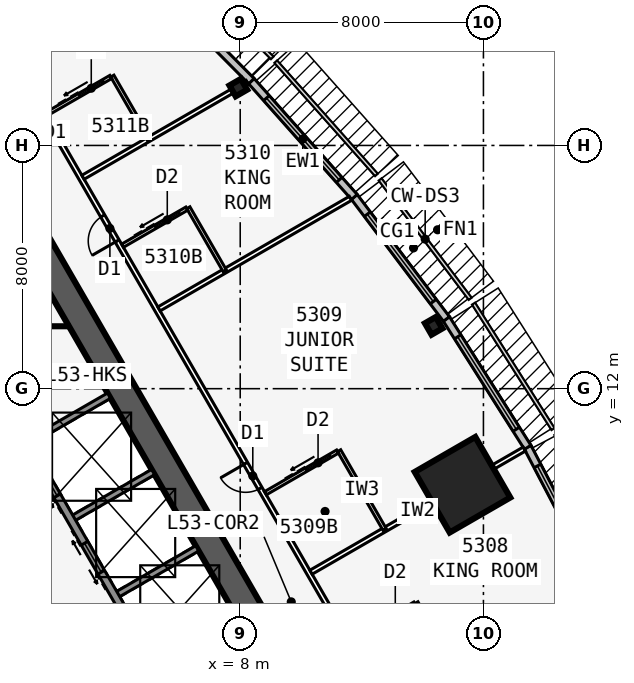
"""IFC4 building model, lengths in metres.
Left out: names, types, materials, properties, quantities, classifications, styles, units other than length and angle.
Written with IfcOpenShell. Run it as: python <this file> out.ifc"""

import sys

from ifc_helpers import new_model, si_unit, direction, frame, frame_2d, origin, origin_2d, place, context, subcontext, project, spatial, rectangle, i_section, extrude, element, fill, save


model = new_model("IFC4")
c1 = context("Model", 3, precision=1e-05, world=origin(), true_north=direction((0.0, 1.0)))
c2 = subcontext(c1, "Body", "Model", "MODEL_VIEW")
j1 = project(units=[si_unit("LENGTHUNIT", "METRE"), si_unit("PLANEANGLEUNIT", "RADIAN")], contexts=[c1])
p1 = place(None, origin())
s1 = spatial("IfcSite", under=j1, at=p1, CompositionType="ELEMENT")
p2 = place(p1, origin())
s2 = spatial("IfcBuilding", under=s1, at=p2, CompositionType="ELEMENT")
p3 = place(p2, frame((0.0, 0.0, 200.9)))
s3 = spatial("IfcBuildingStorey", under=s2, at=p3, CompositionType="ELEMENT", Elevation=200.9)
p4 = place(p3, frame((16.5, -9.526, 0.0), z_axis=(0.0, 0.0, 1.0), x_axis=(-0.499999749417, 0.866025548458, 0.0)))
e1 = element("IfcWall", 1, at=p4, inside=s3, PredefinedType="SHEAR", context=c2, shape_type="SweptSolid", body=[
    extrude(rectangle(XDim=33.0, YDim=0.9, at=frame_2d((16.5, 0.0))), origin(), (0.0, 0.0, 1.0), 3.6),
])
p5 = place(p4, frame((14.15, 0.0, 0.0)))
e2 = element("IfcOpeningElement", 2, at=p5, cuts=e1, PredefinedType="OPENING", context=c2, shape_type="SweptSolid", body=[
    extrude(rectangle(XDim=1.8, YDim=2.13, at=frame_2d((0.9, 1.065))), frame((0.0, 0.46, 0.0), z_axis=(0.0, -1.0, 0.0), x_axis=(1.0, 0.0, 0.0)), (0.0, 0.0, 1.0), 0.92),
])
p6 = place(p4, frame((12.6, 0.0, 0.0)))
e3 = element("IfcOpeningElement", 3, at=p6, cuts=e1, PredefinedType="OPENING", context=c2, shape_type="SweptSolid", body=[
    extrude(rectangle(XDim=1.0, YDim=2.13, at=frame_2d((0.5, 1.065))), frame((0.0, 0.46, 0.0), z_axis=(0.0, -1.0, 0.0), x_axis=(1.0, 0.0, 0.0)), (0.0, 0.0, 1.0), 0.92),
])
p7 = place(p3, frame((5.379, 2.586, 0.0), z_axis=(0.0, 0.0, 1.0), x_axis=(-0.500001375892, 0.866024609411, 0.0)))
e4 = element("IfcWall", 4, at=p7, inside=s3, PredefinedType="SOLIDWALL", context=c2, shape_type="SweptSolid", body=[
    extrude(rectangle(XDim=10.633, YDim=0.25, at=frame_2d((5.316, 0.0))), origin(), (0.0, 0.0, 1.0), 3.435),
])
p8 = place(p7, frame((9.164, 0.0, 0.0)))
e5 = element("IfcOpeningElement", 5, at=p8, cuts=e4, PredefinedType="OPENING", context=c2, shape_type="SweptSolid", body=[
    extrude(rectangle(XDim=0.9, YDim=2.13, at=frame_2d((0.45, 1.065))), frame((0.0, 0.135, 0.0), z_axis=(0.0, -1.0, 0.0), x_axis=(1.0, 0.0, 0.0)), (0.0, 0.0, 1.0), 0.27),
])
p9 = place(p7, frame((1.0, 0.0, 0.0)))
e6 = element("IfcOpeningElement", 6, at=p9, cuts=e4, PredefinedType="OPENING", context=c2, shape_type="SweptSolid", body=[
    extrude(rectangle(XDim=1.1, YDim=2.13, at=frame_2d((0.55, 1.065))), frame((0.0, 0.135, 0.0), z_axis=(0.0, -1.0, 0.0), x_axis=(1.0, 0.0, 0.0)), (0.0, 0.0, 1.0), 0.27),
])
p10 = place(p7, frame((3.9, 0.0, 0.0)))
e7 = element("IfcOpeningElement", 7, at=p10, cuts=e4, PredefinedType="OPENING", context=c2, shape_type="SweptSolid", body=[
    extrude(rectangle(XDim=1.1, YDim=2.13, at=frame_2d((0.55, 1.065))), frame((0.0, 0.135, 0.0), z_axis=(0.0, -1.0, 0.0), x_axis=(1.0, 0.0, 0.0)), (0.0, 0.0, 1.0), 0.27),
])
p11 = place(p7, frame((6.8, 0.0, 0.0)))
e8 = element("IfcOpeningElement", 8, at=p11, cuts=e4, PredefinedType="OPENING", context=c2, shape_type="SweptSolid", body=[
    extrude(rectangle(XDim=1.1, YDim=2.13, at=frame_2d((0.55, 1.065))), frame((0.0, 0.135, 0.0), z_axis=(0.0, -1.0, 0.0), x_axis=(1.0, 0.0, 0.0)), (0.0, 0.0, 1.0), 0.27),
])
for number, where, z_axis, x_axis in (
    (9, (3.879, 5.184, 0.0), (0.0, 0.0, 1.0), (0.866, 0.5, 0.0)),
    (10, (2.429, 7.696, 0.0), (0.0, 0.0, 1.0), (0.866, 0.5, 0.0)),
    (11, (0.979, 10.207, 0.0), (0.0, 0.0, 1.0), (0.866, 0.5, 0.0)),
):
    element("IfcWall", number, at=place(p3, frame(where, z_axis=z_axis, x_axis=x_axis)), inside=s3, PredefinedType="SOLIDWALL", context=c2, shape_type="SweptSolid", body=[
        extrude(rectangle(XDim=3.125, YDim=0.2, at=frame_2d((1.562, 0.0))), origin(), (0.0, 0.0, 1.0), 3.435),
    ])
for number, where, z_axis, x_axis in (
    (12, (14.363, 14.066, 0.0), (0.0, 0.0, 1.0), (0.866, 0.5, 0.0)),
    (13, (7.937, 21.903, 0.0), (0.0, 0.0, 1.0), (-0.5, 0.866, 0.0)),
):
    element("IfcColumn", number, at=place(p3, frame(where, z_axis=z_axis, x_axis=x_axis)), inside=s3, PredefinedType="COLUMN", context=c2, shape_type="SweptSolid", body=[
        extrude(i_section(OverallWidth=0.411, OverallDepth=0.434, WebThickness=0.036, FlangeThickness=0.057, at=origin_2d()), origin(), (0.0, 0.0, 1.0), 3.6),
    ])
p12 = place(p3, frame((15.312, 8.84, 0.0), z_axis=(0.0, 0.0, 1.0), x_axis=(0.866025403784, 0.5, 0.0)))
e14 = element("IfcColumn", 14, at=p12, inside=s3, PredefinedType="COLUMN", context=c2, shape_type="SweptSolid", body=[
    extrude(rectangle(XDim=2.3, YDim=2.3, at=origin_2d()), origin(), (0.0, 0.0, 1.0), 3.6),
])
p13 = place(p3, frame((19.772, 5.648, 0.0), z_axis=(0.0, 0.0, 1.0), x_axis=(-0.463976002579, 0.885847768542, 0.0)))
e15 = element("IfcWall", 15, at=p13, inside=s3, PredefinedType="STANDARD", context=c2, shape_type="SweptSolid", body=[
    extrude(rectangle(XDim=5.004, YDim=0.25, at=frame_2d((2.502, 0.0))), origin(), (0.0, 0.0, 1.0), 3.435),
])
p14 = place(p13, frame((0.702, 0.0, 0.45)))
e16 = element("IfcOpeningElement", 16, at=p14, cuts=e15, PredefinedType="OPENING", context=c2, shape_type="SweptSolid", body=[
    extrude(rectangle(XDim=3.6, YDim=2.6, at=frame_2d((1.8, 1.3))), frame((0.0, 0.135, 0.0), z_axis=(0.0, -1.0, 0.0), x_axis=(1.0, 0.0, 0.0)), (0.0, 0.0, 1.0), 0.27),
])
p15 = place(p3, frame((17.456, 10.072, 0.0), z_axis=(0.0, 0.0, 1.0), x_axis=(-0.535220361449, 0.844712474568, 0.0)))
e17 = element("IfcWall", 17, at=p15, inside=s3, PredefinedType="STANDARD", context=c2, shape_type="SweptSolid", body=[
    extrude(rectangle(XDim=5.004, YDim=0.25, at=frame_2d((2.502, 0.0))), origin(), (0.0, 0.0, 1.0), 3.435),
])
p16 = place(p15, frame((0.702, 0.0, 0.45)))
e18 = element("IfcOpeningElement", 18, at=p16, cuts=e17, PredefinedType="OPENING", context=c2, shape_type="SweptSolid", body=[
    extrude(rectangle(XDim=3.6, YDim=2.6, at=frame_2d((1.8, 1.3))), frame((0.0, 0.135, 0.0), z_axis=(0.0, -1.0, 0.0), x_axis=(1.0, 0.0, 0.0)), (0.0, 0.0, 1.0), 0.27),
])
p17 = place(p3, frame((14.783, 14.291, 0.0), z_axis=(0.0, 0.0, 1.0), x_axis=(-0.602408653511, 0.798187831388, 0.0)))
e19 = element("IfcWall", 19, at=p17, inside=s3, PredefinedType="STANDARD", context=c2, shape_type="SweptSolid", body=[
    extrude(rectangle(XDim=5.038, YDim=0.25, at=frame_2d((2.519, 0.0))), origin(), (0.0, 0.0, 1.0), 3.435),
])
p18 = place(p17, frame((0.719, 0.0, 0.45)))
e20 = element("IfcOpeningElement", 20, at=p18, cuts=e19, PredefinedType="OPENING", context=c2, shape_type="SweptSolid", body=[
    extrude(rectangle(XDim=3.6, YDim=2.6, at=frame_2d((1.8, 1.3))), frame((0.0, 0.135, 0.0), z_axis=(0.0, -1.0, 0.0), x_axis=(1.0, 0.0, 0.0)), (0.0, 0.0, 1.0), 0.27),
])
p19 = place(p3, frame((11.754, 18.304, 0.0), z_axis=(0.0, 0.0, 1.0), x_axis=(-0.664348996191, 0.747422511876, 0.0)))
e21 = element("IfcWall", 21, at=p19, inside=s3, PredefinedType="STANDARD", context=c2, shape_type="SweptSolid", body=[
    extrude(rectangle(XDim=5.105, YDim=0.25, at=frame_2d((2.552, 0.0))), origin(), (0.0, 0.0, 1.0), 3.435),
])
p20 = place(p19, frame((0.752, 0.0, 0.45)))
e22 = element("IfcOpeningElement", 22, at=p20, cuts=e21, PredefinedType="OPENING", context=c2, shape_type="SweptSolid", body=[
    extrude(rectangle(XDim=3.6, YDim=2.6, at=frame_2d((1.8, 1.3))), frame((0.0, 0.135, 0.0), z_axis=(0.0, -1.0, 0.0), x_axis=(1.0, 0.0, 0.0)), (0.0, 0.0, 1.0), 0.27),
])
p21 = place(p3, frame((8.368, 22.115, 0.0), z_axis=(0.0, 0.0, 1.0), x_axis=(-0.704149946111, 0.710051303352, 0.0)))
e23 = element("IfcWall", 23, at=p21, inside=s3, PredefinedType="STANDARD", context=c2, shape_type="SweptSolid", body=[
    extrude(rectangle(XDim=2.069, YDim=0.25, at=frame_2d((1.034, 0.0))), origin(), (0.0, 0.0, 1.0), 3.435),
])
p22 = place(p3, frame((20.027, -10.985, 0.0), z_axis=(0.0, 0.0, 1.0), x_axis=(-0.500001677587, 0.866024435227, 0.0)))
e24 = element("IfcWall", 24, at=p22, inside=s3, PredefinedType="PARTITIONING", context=c2, shape_type="SweptSolid", body=[
    extrude(rectangle(XDim=39.054, YDim=0.15, at=frame_2d((19.527, 0.0))), origin(), (0.0, 0.0, 1.0), 3.435),
])
p23 = place(p22, frame((1.558, 0.0, 0.0)))
e25 = element("IfcOpeningElement", 25, at=p23, cuts=e24, PredefinedType="OPENING", context=c2, shape_type="SweptSolid", body=[
    extrude(rectangle(XDim=0.95, YDim=2.13, at=frame_2d((0.475, 1.065))), frame((0.0, 0.085, 0.0), z_axis=(0.0, -1.0, 0.0), x_axis=(1.0, 0.0, 0.0)), (0.0, 0.0, 1.0), 0.17),
])
p24 = place(p22, frame((12.752, 0.0, 0.0)))
e26 = element("IfcOpeningElement", 26, at=p24, cuts=e24, PredefinedType="OPENING", context=c2, shape_type="SweptSolid", body=[
    extrude(rectangle(XDim=0.95, YDim=2.13, at=frame_2d((0.475, 1.065))), frame((0.0, 0.085, 0.0), z_axis=(0.0, -1.0, 0.0), x_axis=(1.0, 0.0, 0.0)), (0.0, 0.0, 1.0), 0.17),
])
p25 = place(p22, frame((17.152, 0.0, 0.0)))
e27 = element("IfcOpeningElement", 27, at=p25, cuts=e24, PredefinedType="OPENING", context=c2, shape_type="SweptSolid", body=[
    extrude(rectangle(XDim=0.95, YDim=2.13, at=frame_2d((0.475, 1.065))), frame((0.0, 0.085, 0.0), z_axis=(0.0, -1.0, 0.0), x_axis=(1.0, 0.0, 0.0)), (0.0, 0.0, 1.0), 0.17),
])
p26 = place(p22, frame((22.752, 0.0, 0.0)))
e28 = element("IfcOpeningElement", 28, at=p26, cuts=e24, PredefinedType="OPENING", context=c2, shape_type="SweptSolid", body=[
    extrude(rectangle(XDim=0.95, YDim=2.13, at=frame_2d((0.475, 1.065))), frame((0.0, 0.085, 0.0), z_axis=(0.0, -1.0, 0.0), x_axis=(1.0, 0.0, 0.0)), (0.0, 0.0, 1.0), 0.17),
])
p27 = place(p22, frame((32.152, 0.0, 0.0)))
e29 = element("IfcOpeningElement", 29, at=p27, cuts=e24, PredefinedType="OPENING", context=c2, shape_type="SweptSolid", body=[
    extrude(rectangle(XDim=0.95, YDim=2.13, at=frame_2d((0.475, 1.065))), frame((0.0, 0.085, 0.0), z_axis=(0.0, -1.0, 0.0), x_axis=(1.0, 0.0, 0.0)), (0.0, 0.0, 1.0), 0.17),
])
p28 = place(p22, frame((37.152, 0.0, 0.0)))
e30 = element("IfcOpeningElement", 30, at=p28, cuts=e24, PredefinedType="OPENING", context=c2, shape_type="SweptSolid", body=[
    extrude(rectangle(XDim=0.95, YDim=2.13, at=frame_2d((0.475, 1.065))), frame((0.0, 0.085, 0.0), z_axis=(0.0, -1.0, 0.0), x_axis=(1.0, 0.0, 0.0)), (0.0, 0.0, 1.0), 0.17),
])
p29 = place(p3, frame((12.829, 1.633, 0.0), z_axis=(0.0, 0.0, 1.0), x_axis=(0.866030558329, 0.49999107196, 0.0)))
e31 = element("IfcWall", 31, at=p29, inside=s3, PredefinedType="PARTITIONING", context=c2, shape_type="SweptSolid", body=[
    extrude(rectangle(XDim=7.894, YDim=0.15, at=frame_2d((3.947, 0.0))), origin(), (0.0, 0.0, 1.0), 2.589),
])
p30 = place(p3, frame((10.329, 5.963, 0.0), z_axis=(0.0, 0.0, 1.0), x_axis=(0.866016460812, 0.500015489362, 0.0)))
e32 = element("IfcWall", 32, at=p30, inside=s3, PredefinedType="PARTITIONING", context=c2, shape_type="SweptSolid", body=[
    extrude(rectangle(XDim=8.101, YDim=0.15, at=frame_2d((4.051, 0.0))), origin(), (0.0, 0.0, 1.0), 2.589),
])
p31 = place(p3, frame((5.329, 14.623, 0.0), z_axis=(0.0, 0.0, 1.0), x_axis=(0.866017877653, 0.500013035415, 0.0)))
e33 = element("IfcWall", 33, at=p31, inside=s3, PredefinedType="PARTITIONING", context=c2, shape_type="SweptSolid", body=[
    extrude(rectangle(XDim=7.273, YDim=0.15, at=frame_2d((3.636, 0.0))), origin(), (0.0, 0.0, 1.0), 2.589),
])
p32 = place(p3, frame((2.829, 18.954, 0.0), z_axis=(0.0, 0.0, 1.0), x_axis=(0.866026604282, 0.499997920671, 0.0)))
e34 = element("IfcWall", 34, at=p32, inside=s3, PredefinedType="PARTITIONING", context=c2, shape_type="SweptSolid", body=[
    extrude(rectangle(XDim=6.24, YDim=0.15, at=frame_2d((3.12, 0.0))), origin(), (0.0, 0.0, 1.0), 2.589),
])
p33 = place(p3, frame((14.993, 2.883, 0.0), z_axis=(0.0, 0.0, 1.0), x_axis=(-0.500001309137, 0.866024647952, 0.0)))
e35 = element("IfcWall", 35, at=p33, inside=s3, PredefinedType="PLUMBINGWALL", context=c2, shape_type="SweptSolid", body=[
    extrude(rectangle(XDim=2.4, YDim=0.12, at=frame_2d((1.2, 0.0))), origin(), (0.0, 0.0, 1.0), 3.435),
])
p34 = place(p3, frame((11.628, 3.711, 0.0), z_axis=(0.0, 0.0, 1.0), x_axis=(0.866048967903, 0.499959183527, 0.0)))
e36 = element("IfcWall", 36, at=p34, inside=s3, PredefinedType="PLUMBINGWALL", context=c2, shape_type="SweptSolid", body=[
    extrude(rectangle(XDim=2.44, YDim=0.12, at=frame_2d((1.22, 0.0))), origin(), (0.0, 0.0, 1.0), 3.435),
])
p35 = place(p34, frame((1.25, 0.0, 0.0)))
e37 = element("IfcOpeningElement", 37, at=p35, cuts=e36, PredefinedType="OPENING", context=c2, shape_type="SweptSolid", body=[
    extrude(rectangle(XDim=0.9, YDim=2.13, at=frame_2d((0.45, 1.065))), frame((0.0, 0.07, 0.0), z_axis=(0.0, -1.0, 0.0), x_axis=(1.0, 0.0, 0.0)), (0.0, 0.0, 1.0), 0.14),
])
p36 = place(p3, frame((12.753, 7.363, 0.0), z_axis=(0.0, 0.0, 1.0), x_axis=(-0.499990139034, 0.866031096941, 0.0)))
e38 = element("IfcWall", 38, at=p36, inside=s3, PredefinedType="PLUMBINGWALL", context=c2, shape_type="SweptSolid", body=[
    extrude(rectangle(XDim=3.0, YDim=0.12, at=frame_2d((1.5, 0.0))), origin(), (0.0, 0.0, 1.0), 3.435),
])
p37 = place(p3, frame((8.829, 8.561, 0.0), z_axis=(0.0, 0.0, 1.0), x_axis=(0.866035715982, 0.499982138324, 0.0)))
e39 = element("IfcWall", 39, at=p37, inside=s3, PredefinedType="PLUMBINGWALL", context=c2, shape_type="SweptSolid", body=[
    extrude(rectangle(XDim=2.74, YDim=0.12, at=frame_2d((1.37, 0.0))), origin(), (0.0, 0.0, 1.0), 3.435),
])
p38 = place(p37, frame((1.55, 0.0, 0.0)))
e40 = element("IfcOpeningElement", 40, at=p38, cuts=e39, PredefinedType="OPENING", context=c2, shape_type="SweptSolid", body=[
    extrude(rectangle(XDim=0.9, YDim=2.13, at=frame_2d((0.45, 1.065))), frame((0.0, 0.07, 0.0), z_axis=(0.0, -1.0, 0.0), x_axis=(1.0, 0.0, 0.0)), (0.0, 0.0, 1.0), 0.14),
])
p39 = place(p3, frame((7.493, 15.873, 0.0), z_axis=(0.0, 0.0, 1.0), x_axis=(-0.499957262057, 0.866050077142, 0.0)))
e41 = element("IfcWall", 41, at=p39, inside=s3, PredefinedType="PLUMBINGWALL", context=c2, shape_type="SweptSolid", body=[
    extrude(rectangle(XDim=2.4, YDim=0.12, at=frame_2d((1.2, 0.0))), origin(), (0.0, 0.0, 1.0), 3.435),
])
p40 = place(p3, frame((4.128, 16.702, 0.0), z_axis=(0.0, 0.0, 1.0), x_axis=(0.866048967903, 0.499959183527, 0.0)))
e42 = element("IfcWall", 42, at=p40, inside=s3, PredefinedType="PLUMBINGWALL", context=c2, shape_type="SweptSolid", body=[
    extrude(rectangle(XDim=2.44, YDim=0.12, at=frame_2d((1.22, 0.0))), origin(), (0.0, 0.0, 1.0), 3.435),
])
p41 = place(p40, frame((1.25, 0.0, 0.0)))
e43 = element("IfcOpeningElement", 43, at=p41, cuts=e42, PredefinedType="OPENING", context=c2, shape_type="SweptSolid", body=[
    extrude(rectangle(XDim=0.9, YDim=2.13, at=frame_2d((0.45, 1.065))), frame((0.0, 0.07, 0.0), z_axis=(0.0, -1.0, 0.0), x_axis=(1.0, 0.0, 0.0)), (0.0, 0.0, 1.0), 0.14),
])
p42 = place(p3, frame((4.993, 20.204, 0.0), z_axis=(0.0, 0.0, 1.0), x_axis=(-0.500001309137, 0.866024647952, 0.0)))
e44 = element("IfcWall", 44, at=p42, inside=s3, PredefinedType="PLUMBINGWALL", context=c2, shape_type="SweptSolid", body=[
    extrude(rectangle(XDim=2.4, YDim=0.12, at=frame_2d((1.2, 0.0))), origin(), (0.0, 0.0, 1.0), 3.435),
])
p43 = place(p3, frame((1.628, 21.032, 0.0), z_axis=(0.0, 0.0, 1.0), x_axis=(0.866048967903, 0.499959183527, 0.0)))
e45 = element("IfcWall", 45, at=p43, inside=s3, PredefinedType="PLUMBINGWALL", context=c2, shape_type="SweptSolid", body=[
    extrude(rectangle(XDim=2.44, YDim=0.12, at=frame_2d((1.22, 0.0))), origin(), (0.0, 0.0, 1.0), 3.435),
])
p44 = place(p43, frame((1.25, 0.0, 0.0)))
e46 = element("IfcOpeningElement", 46, at=p44, cuts=e45, PredefinedType="OPENING", context=c2, shape_type="SweptSolid", body=[
    extrude(rectangle(XDim=0.9, YDim=2.13, at=frame_2d((0.45, 1.065))), frame((0.0, 0.07, 0.0), z_axis=(0.0, -1.0, 0.0), x_axis=(1.0, 0.0, 0.0)), (0.0, 0.0, 1.0), 0.14),
])
p45 = place(p3, frame((-2.367, 14.052, 0.0), z_axis=(0.0, 0.0, 1.0), x_axis=(1.0, 0.0, 0.0)))
e47 = element("IfcWall", 47, at=p45, inside=s3, PredefinedType="PARTITIONING", context=c2, shape_type="SweptSolid", body=[
    extrude(rectangle(XDim=4.734, YDim=0.1, at=frame_2d((2.367, 0.0))), origin(), (0.0, 0.0, 1.0), 3.435),
])
p46 = place(p45, frame((0.734, 0.0, 0.0)))
e48 = element("IfcOpeningElement", 48, at=p46, cuts=e47, PredefinedType="OPENING", context=c2, shape_type="SweptSolid", body=[
    extrude(rectangle(XDim=0.9, YDim=2.13, at=frame_2d((0.45, 1.065))), frame((0.0, 0.06, 0.0), z_axis=(0.0, -1.0, 0.0), x_axis=(1.0, 0.0, 0.0)), (0.0, 0.0, 1.0), 0.12),
])
p47 = place(p14, origin())
e49 = element("IfcWindow", 49, at=p47, inside=s3, PartitioningType="SINGLE_PANEL", PredefinedType="WINDOW", context=c2, shape_type="SweptSolid", body=[
    extrude(rectangle(XDim=3.6, YDim=2.6, at=frame_2d((1.8, 1.3))), frame((0.0, 0.03, 0.0), z_axis=(0.0, -1.0, 0.0), x_axis=(1.0, 0.0, 0.0)), (0.0, 0.0, 1.0), 0.06),
])
fill(e16, e49)
p48 = place(p16, origin())
e50 = element("IfcWindow", 50, at=p48, inside=s3, PartitioningType="SINGLE_PANEL", PredefinedType="WINDOW", context=c2, shape_type="SweptSolid", body=[
    extrude(rectangle(XDim=3.6, YDim=2.6, at=frame_2d((1.8, 1.3))), frame((0.0, 0.03, 0.0), z_axis=(0.0, -1.0, 0.0), x_axis=(1.0, 0.0, 0.0)), (0.0, 0.0, 1.0), 0.06),
])
fill(e18, e50)
p49 = place(p18, origin())
e51 = element("IfcWindow", 51, at=p49, inside=s3, PartitioningType="SINGLE_PANEL", PredefinedType="WINDOW", context=c2, shape_type="SweptSolid", body=[
    extrude(rectangle(XDim=3.6, YDim=2.6, at=frame_2d((1.8, 1.3))), frame((0.0, 0.03, 0.0), z_axis=(0.0, -1.0, 0.0), x_axis=(1.0, 0.0, 0.0)), (0.0, 0.0, 1.0), 0.06),
])
fill(e20, e51)
p50 = place(p20, origin())
e52 = element("IfcWindow", 52, at=p50, inside=s3, PartitioningType="SINGLE_PANEL", PredefinedType="WINDOW", context=c2, shape_type="SweptSolid", body=[
    extrude(rectangle(XDim=3.6, YDim=2.6, at=frame_2d((1.8, 1.3))), frame((0.0, 0.03, 0.0), z_axis=(0.0, -1.0, 0.0), x_axis=(1.0, 0.0, 0.0)), (0.0, 0.0, 1.0), 0.06),
])
fill(e22, e52)
p51 = place(p38, origin())
e53 = element("IfcDoor", 53, at=p51, inside=s3, OperationType="SLIDING_TO_LEFT", PredefinedType="DOOR", context=c2, shape_type="SweptSolid", body=[
    extrude(rectangle(XDim=0.9, YDim=2.13, at=frame_2d((0.45, 1.065))), frame((0.0, 0.025, 0.0), z_axis=(0.0, -1.0, 0.0), x_axis=(1.0, 0.0, 0.0)), (0.0, 0.0, 1.0), 0.05),
])
fill(e40, e53)
p52 = place(p26, origin())
e54 = element("IfcDoor", 54, at=p52, inside=s3, OperationType="SINGLE_SWING_RIGHT", PredefinedType="DOOR", context=c2, shape_type="SweptSolid", body=[
    extrude(rectangle(XDim=0.95, YDim=2.13, at=frame_2d((0.475, 1.065))), frame((0.0, 0.025, 0.0), z_axis=(0.0, -1.0, 0.0), x_axis=(1.0, 0.0, 0.0)), (0.0, 0.0, 1.0), 0.05),
])
fill(e28, e54)
p53 = place(p41, origin())
e55 = element("IfcDoor", 55, at=p53, inside=s3, OperationType="SLIDING_TO_LEFT", PredefinedType="DOOR", context=c2, shape_type="SweptSolid", body=[
    extrude(rectangle(XDim=0.9, YDim=2.13, at=frame_2d((0.45, 1.065))), frame((0.0, 0.025, 0.0), z_axis=(0.0, -1.0, 0.0), x_axis=(1.0, 0.0, 0.0)), (0.0, 0.0, 1.0), 0.05),
])
fill(e43, e55)
p54 = place(p27, origin())
e56 = element("IfcDoor", 56, at=p54, inside=s3, OperationType="SINGLE_SWING_LEFT", PredefinedType="DOOR", context=c2, shape_type="SweptSolid", body=[
    extrude(rectangle(XDim=0.95, YDim=2.13, at=frame_2d((0.475, 1.065))), frame((0.0, 0.025, 0.0), z_axis=(0.0, -1.0, 0.0), x_axis=(1.0, 0.0, 0.0)), (0.0, 0.0, 1.0), 0.05),
])
fill(e29, e56)
p55 = place(p44, origin())
e57 = element("IfcDoor", 57, at=p55, inside=s3, OperationType="SLIDING_TO_LEFT", PredefinedType="DOOR", context=c2, shape_type="SweptSolid", body=[
    extrude(rectangle(XDim=0.9, YDim=2.13, at=frame_2d((0.45, 1.065))), frame((0.0, 0.025, 0.0), z_axis=(0.0, -1.0, 0.0), x_axis=(1.0, 0.0, 0.0)), (0.0, 0.0, 1.0), 0.05),
])
fill(e46, e57)
p56 = place(p10, origin())
e58 = element("IfcDoor", 58, at=p56, inside=s3, OperationType="DOUBLE_DOOR_SLIDING", PredefinedType="USERDEFINED", context=c2, shape_type="SweptSolid", body=[
    extrude(rectangle(XDim=1.1, YDim=2.13, at=frame_2d((0.55, 1.065))), frame((0.0, 0.025, 0.0), z_axis=(0.0, -1.0, 0.0), x_axis=(1.0, 0.0, 0.0)), (0.0, 0.0, 1.0), 0.05),
])
fill(e7, e58)
p57 = place(p11, origin())
e59 = element("IfcDoor", 59, at=p57, inside=s3, OperationType="DOUBLE_DOOR_SLIDING", PredefinedType="USERDEFINED", context=c2, shape_type="SweptSolid", body=[
    extrude(rectangle(XDim=1.1, YDim=2.13, at=frame_2d((0.55, 1.065))), frame((0.0, 0.025, 0.0), z_axis=(0.0, -1.0, 0.0), x_axis=(1.0, 0.0, 0.0)), (0.0, 0.0, 1.0), 0.05),
])
fill(e8, e59)
save(model, sys.argv[1])
